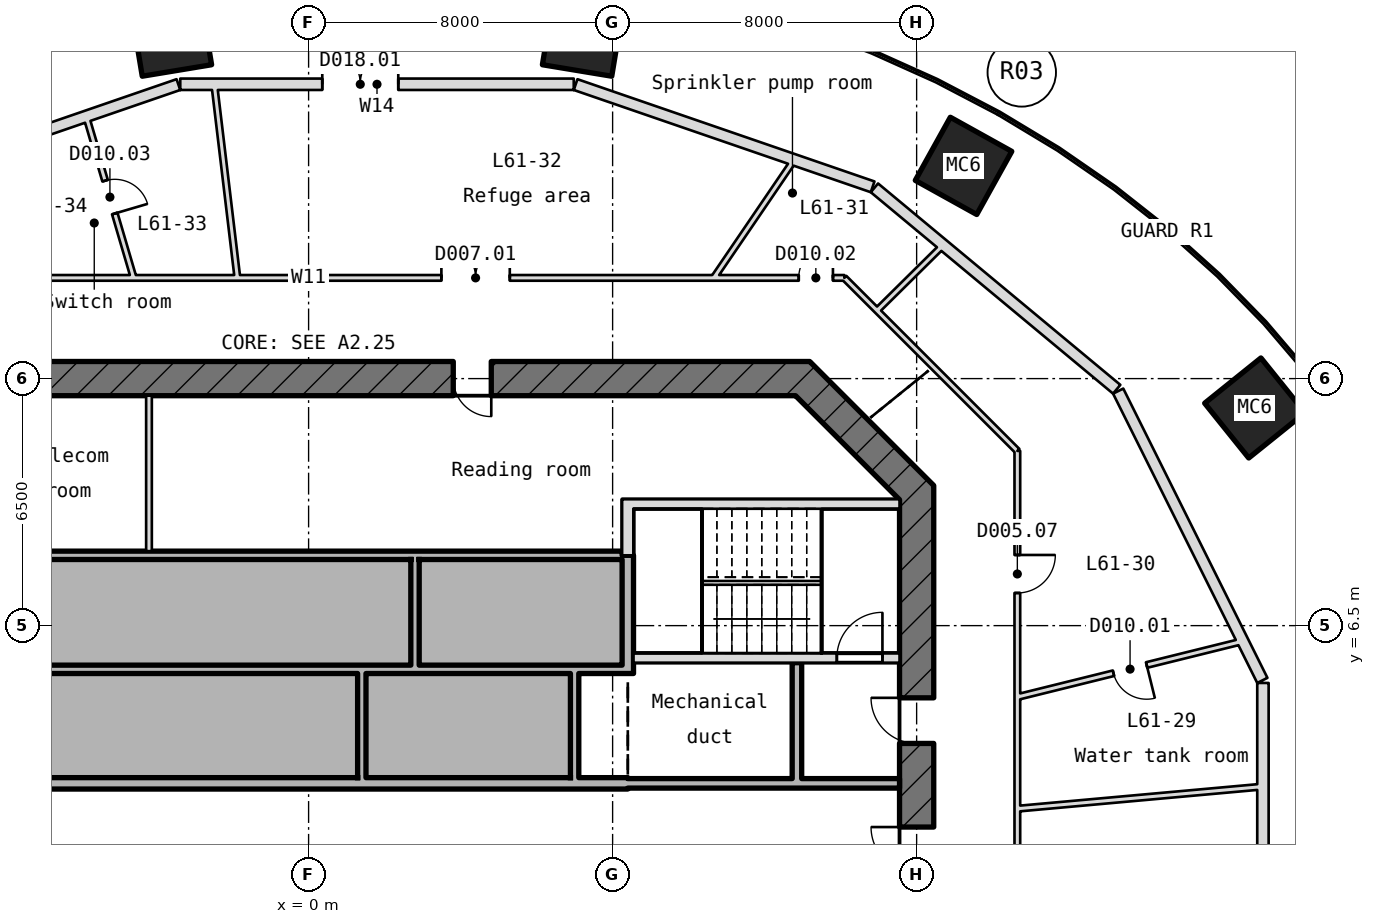
"""IFC4 building model, lengths in metres.
Left out: names, types, materials, properties, quantities, classifications, styles, units other than length and angle.
Written with IfcOpenShell. Run it as: python <this file> out.ifc"""

import sys

from ifc_helpers import new_model, si_unit, direction, frame, frame_2d, origin, place, context, subcontext, project, spatial, polyline, rectangle, outline, extrude, element, fill, save


model = new_model("IFC4")
c1 = context("Model", 3, precision=1e-05, world=origin(), true_north=direction((0.0, 1.0)))
c2 = subcontext(c1, "Body", "Model", "MODEL_VIEW")
j1 = project(units=[si_unit("LENGTHUNIT", "METRE"), si_unit("PLANEANGLEUNIT", "RADIAN")], contexts=[c1])
p1 = place(None, origin())
s1 = spatial("IfcSite", under=j1, at=p1, CompositionType="ELEMENT")
p2 = place(p1, origin())
s2 = spatial("IfcBuilding", under=s1, at=p2, CompositionType="ELEMENT")
p3 = place(p2, frame((0.0, 0.0, 273.1)))
s3 = spatial("IfcBuildingStorey", under=s2, at=p3, CompositionType="ELEMENT", Elevation=273.1)
p4 = place(p3, frame((0.0, 0.0, -0.3)))
e1 = element("IfcColumn", 1, at=p4, inside=s3, PredefinedType="COLUMN", context=c2, shape_type="SweptSolid", body=[
    extrude(outline(polyline([(28.339, 2.783), (25.704, 4.212), (25.273, 6.011), (27.121, 6.454), (29.756, 5.025), (30.186, 3.226), (28.339, 2.783)])), origin(), (0.0, 0.0, 1.0), 6.05),
])
p5 = place(p3, frame((0.0, 0.0, -0.3)))
e2 = element("IfcColumn", 2, at=p5, inside=s3, PredefinedType="COLUMN", context=c2, shape_type="SweptSolid", body=[
    extrude(outline(polyline([(24.738, 10.911), (22.17, 12.208), (21.011, 13.65), (22.491, 14.84), (25.06, 13.543), (26.219, 12.101), (24.738, 10.911)])), origin(), (0.0, 0.0, 1.0), 6.05),
])
p6 = place(p3, frame((0.0, 0.0, -0.3)))
e3 = element("IfcColumn", 3, at=p6, inside=s3, PredefinedType="COLUMN", context=c2, shape_type="SweptSolid", body=[
    extrude(outline(polyline([(17.582, 17.317), (15.136, 18.514), (13.518, 19.412), (14.441, 21.073), (16.887, 19.877), (18.504, 18.979), (17.582, 17.317)])), origin(), (0.0, 0.0, 1.0), 6.05),
])
p7 = place(p3, frame((0.0, 0.0, -0.3)))
e4 = element("IfcColumn", 4, at=p7, inside=s3, PredefinedType="COLUMN", context=c2, shape_type="SweptSolid", body=[
    extrude(outline(polyline([(7.978, 20.956), (6.152, 21.258), (3.866, 22.4), (4.176, 24.274), (6.001, 23.973), (8.287, 22.831), (7.978, 20.956)])), origin(), (0.0, 0.0, 1.0), 6.05),
])
p8 = place(p3, frame((0.0, 0.0, -0.3)))
e5 = element("IfcColumn", 5, at=p8, inside=s3, PredefinedType="COLUMN", context=c2, shape_type="SweptSolid", body=[
    extrude(outline(polyline([(-4.377, 20.956), (-6.491, 22.098), (-6.801, 23.973), (-4.976, 24.274), (-2.862, 23.133), (-2.552, 21.258), (-4.377, 20.956)])), origin(), (0.0, 0.0, 1.0), 6.05),
])
p9 = place(p3, frame((16.0, -10.186, -0.3), z_axis=(0.0, 0.0, 1.0), x_axis=(0.0, 1.0, 0.0)))
e6 = element("IfcWall", 6, at=p9, inside=s3, PredefinedType="SHEAR", context=c2, shape_type="SweptSolid", body=[
    extrude(rectangle(XDim=20.373, YDim=0.9, at=frame_2d((10.186, 0.0))), origin(), (0.0, 0.0, 1.0), 6.05),
])
p10 = place(p9, frame((8.986, 0.0, 0.3)))
e7 = element("IfcOpeningElement", 7, at=p10, cuts=e6, PredefinedType="OPENING", context=c2, shape_type="SweptSolid", body=[
    extrude(rectangle(XDim=2.4, YDim=2.1, at=frame_2d((1.2, 1.05))), frame((0.0, 0.46, 0.0), z_axis=(0.0, -1.0, 0.0), x_axis=(1.0, 0.0, 0.0)), (0.0, 0.0, 1.0), 0.92),
])
p11 = place(p9, frame((13.586, 0.0, 0.3)))
e8 = element("IfcOpeningElement", 8, at=p11, cuts=e6, PredefinedType="OPENING", context=c2, shape_type="SweptSolid", body=[
    extrude(rectangle(XDim=1.2, YDim=2.1, at=frame_2d((0.6, 1.05))), frame((0.0, 0.46, 0.0), z_axis=(0.0, -1.0, 0.0), x_axis=(1.0, 0.0, 0.0)), (0.0, 0.0, 1.0), 0.92),
])
p12 = place(p9, frame((2.4, 0.0, 0.3)))
e9 = element("IfcOpeningElement", 9, at=p12, cuts=e6, PredefinedType="OPENING", context=c2, shape_type="SweptSolid", body=[
    extrude(rectangle(XDim=1.2, YDim=2.1, at=frame_2d((0.6, 1.05))), frame((0.0, 0.46, 0.0), z_axis=(0.0, -1.0, 0.0), x_axis=(1.0, 0.0, 0.0)), (0.0, 0.0, 1.0), 0.92),
])
p13 = place(p3, frame((16.132, 9.868, -0.3), z_axis=(0.0, 0.0, 1.0), x_axis=(-0.707106781187, 0.707106781187, 0.0)))
e10 = element("IfcWall", 10, at=p13, inside=s3, PredefinedType="SHEAR", context=c2, shape_type="SweptSolid", body=[
    extrude(rectangle(XDim=4.615, YDim=0.9, at=frame_2d((2.308, 0.0))), origin(), (0.0, 0.0, 1.0), 6.05),
])
p14 = place(p3, frame((13.186, 13.0, -0.3), z_axis=(0.0, 0.0, 1.0), x_axis=(-1.0, 0.0, 0.0)))
e11 = element("IfcWall", 11, at=p14, inside=s3, PredefinedType="SHEAR", context=c2, shape_type="SweptSolid", body=[
    extrude(rectangle(XDim=26.373, YDim=0.9, at=frame_2d((13.186, 0.0))), origin(), (0.0, 0.0, 1.0), 6.05),
])
p15 = place(p14, frame((21.193, 0.0, 0.3)))
e12 = element("IfcOpeningElement", 12, at=p15, cuts=e11, PredefinedType="OPENING", context=c2, shape_type="SweptSolid", body=[
    extrude(rectangle(XDim=1.0, YDim=2.1, at=frame_2d((0.5, 1.05))), frame((0.0, 0.46, 0.0), z_axis=(0.0, -1.0, 0.0), x_axis=(1.0, 0.0, 0.0)), (0.0, 0.0, 1.0), 0.92),
])
p16 = place(p14, frame((8.379, 0.0, 0.3)))
e13 = element("IfcOpeningElement", 13, at=p16, cuts=e11, PredefinedType="OPENING", context=c2, shape_type="SweptSolid", body=[
    extrude(rectangle(XDim=1.0, YDim=2.1, at=frame_2d((0.5, 1.05))), frame((0.0, 0.46, 0.0), z_axis=(0.0, -1.0, 0.0), x_axis=(1.0, 0.0, 0.0)), (0.0, 0.0, 1.0), 0.92),
])
p17 = place(p3, frame((-8.4, 2.35, -0.3), z_axis=(0.0, 0.0, 1.0), x_axis=(1.0, 0.0, 0.0)))
e14 = element("IfcWall", 14, at=p17, inside=s3, PredefinedType="SHEAR", context=c2, shape_type="SweptSolid", body=[
    extrude(rectangle(XDim=16.8, YDim=0.3, at=frame_2d((8.4, 0.0))), origin(), (0.0, 0.0, 1.0), 6.05),
])
p18 = place(p3, frame((8.4, 2.35, 0.0), z_axis=(0.0, 0.0, 1.0), x_axis=(1.0, 0.0, 0.0)))
e15 = element("IfcWall", 15, at=p18, inside=s3, PredefinedType="STANDARD", context=c2, shape_type="SweptSolid", body=[
    extrude(rectangle(XDim=7.15, YDim=0.25, at=frame_2d((3.575, 0.0))), origin(), (0.0, 0.0, 1.0), 5.75),
])
p19 = place(p3, frame((-8.25, 5.35, 0.0), z_axis=(0.0, 0.0, 1.0), x_axis=(1.0, 0.0, 0.0)))
e16 = element("IfcWall", 16, at=p19, inside=s3, PredefinedType="STANDARD", context=c2, shape_type="SweptSolid", body=[
    extrude(rectangle(XDim=16.5, YDim=0.22, at=frame_2d((8.25, 0.0))), origin(), (0.0, 0.0, 1.0), 5.75),
])
p20 = place(p3, frame((8.55, 5.65, -0.3), z_axis=(0.0, 0.0, 1.0), x_axis=(1.0, 0.0, 0.0)))
e17 = element("IfcWall", 17, at=p20, inside=s3, PredefinedType="SHEAR", context=c2, shape_type="SweptSolid", body=[
    extrude(rectangle(XDim=7.0, YDim=0.25, at=frame_2d((3.5, 0.0))), origin(), (0.0, 0.0, 1.0), 6.05),
])
p21 = place(p20, frame((5.35, 0.0, 0.3)))
e18 = element("IfcOpeningElement", 18, at=p21, cuts=e17, PredefinedType="OPENING", context=c2, shape_type="SweptSolid", body=[
    extrude(rectangle(XDim=1.2, YDim=2.1, at=frame_2d((0.6, 1.05))), frame((0.0, 0.135, 0.0), z_axis=(0.0, -1.0, 0.0), x_axis=(1.0, 0.0, 0.0)), (0.0, 0.0, 1.0), 0.27),
])
p22 = place(p3, frame((-8.25, 8.35, 0.0), z_axis=(0.0, 0.0, 1.0), x_axis=(1.0, 0.0, 0.0)))
e19 = element("IfcWall", 19, at=p22, inside=s3, PredefinedType="STANDARD", context=c2, shape_type="SweptSolid", body=[
    extrude(rectangle(XDim=16.5, YDim=0.22, at=frame_2d((8.25, 0.0))), origin(), (0.0, 0.0, 1.0), 5.75),
])
p23 = place(p3, frame((8.55, 9.7, -0.3), z_axis=(0.0, 0.0, 1.0), x_axis=(1.0, 0.0, 0.0)))
e20 = element("IfcWall", 20, at=p23, inside=s3, PredefinedType="SHEAR", context=c2, shape_type="SweptSolid", body=[
    extrude(rectangle(XDim=7.0, YDim=0.25, at=frame_2d((3.5, 0.0))), origin(), (0.0, 0.0, 1.0), 6.05),
])
p24 = place(p3, frame((-4.2, 8.46, 0.0), z_axis=(0.0, 0.0, 1.0), x_axis=(0.0, 1.0, 0.0)))
e21 = element("IfcWall", 21, at=p24, inside=s3, PredefinedType="PARTITIONING", context=c2, shape_type="SweptSolid", body=[
    extrude(rectangle(XDim=4.09, YDim=0.15, at=frame_2d((2.045, 0.0))), origin(), (0.0, 0.0, 1.0), 5.75),
])
p25 = place(p3, frame((1.4, 2.5, 0.0), z_axis=(0.0, 0.0, 1.0), x_axis=(0.0, 1.0, 0.0)))
e22 = element("IfcWall", 22, at=p25, inside=s3, PredefinedType="STANDARD", context=c2, shape_type="SweptSolid", body=[
    extrude(rectangle(XDim=2.74, YDim=0.22, at=frame_2d((1.37, 0.0))), origin(), (0.0, 0.0, 1.0), 5.75),
])
p26 = place(p3, frame((2.8, 5.46, 0.0), z_axis=(0.0, 0.0, 1.0), x_axis=(0.0, 1.0, 0.0)))
e23 = element("IfcWall", 23, at=p26, inside=s3, PredefinedType="STANDARD", context=c2, shape_type="SweptSolid", body=[
    extrude(rectangle(XDim=2.78, YDim=0.22, at=frame_2d((1.39, 0.0))), origin(), (0.0, 0.0, 1.0), 5.75),
])
p27 = place(p3, frame((7.0, 2.5, 0.0), z_axis=(0.0, 0.0, 1.0), x_axis=(0.0, 1.0, 0.0)))
e24 = element("IfcWall", 24, at=p27, inside=s3, PredefinedType="STANDARD", context=c2, shape_type="SweptSolid", body=[
    extrude(rectangle(XDim=2.74, YDim=0.22, at=frame_2d((1.37, 0.0))), origin(), (0.0, 0.0, 1.0), 5.75),
])
p28 = place(p3, frame((8.4, 5.24, -0.3), z_axis=(0.0, 0.0, 1.0), x_axis=(0.0, 1.0, 0.0)))
e25 = element("IfcWall", 25, at=p28, inside=s3, PredefinedType="SHEAR", context=c2, shape_type="SweptSolid", body=[
    extrude(rectangle(XDim=3.11, YDim=0.3, at=frame_2d((1.555, 0.0))), origin(), (0.0, 0.0, 1.0), 6.05),
])
p29 = place(p3, frame((8.4, 8.35, -0.3), z_axis=(0.0, 0.0, 1.0), x_axis=(0.0, 1.0, 0.0)))
e26 = element("IfcWall", 26, at=p29, inside=s3, PredefinedType="SHEAR", context=c2, shape_type="SweptSolid", body=[
    extrude(rectangle(XDim=1.475, YDim=0.3, at=frame_2d((0.737, 0.0))), origin(), (0.0, 0.0, 1.0), 6.05),
])
p30 = place(p3, frame((12.85, 2.475, 0.0), z_axis=(0.0, 0.0, 1.0), x_axis=(0.0, 1.0, 0.0)))
e27 = element("IfcWall", 27, at=p30, inside=s3, PredefinedType="STANDARD", context=c2, shape_type="SweptSolid", body=[
    extrude(rectangle(XDim=3.05, YDim=0.25, at=frame_2d((1.525, 0.0))), origin(), (0.0, 0.0, 1.0), 5.75),
])
p31 = place(p3, frame((-3.377, 20.744, 0.0), z_axis=(0.0, 0.0, 1.0), x_axis=(1.0, 0.0, 0.0)))
e28 = element("IfcWall", 28, at=p31, inside=s3, PredefinedType="STANDARD", context=c2, shape_type="SweptSolid", body=[
    extrude(rectangle(XDim=10.354, YDim=0.3, at=frame_2d((5.177, 0.0))), origin(), (0.0, 0.0, 1.0), 5.75),
])
p32 = place(p31, frame((3.737, 0.0, 0.0)))
e29 = element("IfcOpeningElement", 29, at=p32, cuts=e28, PredefinedType="OPENING", context=c2, shape_type="SweptSolid", body=[
    extrude(rectangle(XDim=2.0, YDim=2.1, at=frame_2d((1.0, 1.05))), frame((0.0, 0.16, 0.0), z_axis=(0.0, -1.0, 0.0), x_axis=(1.0, 0.0, 0.0)), (0.0, 0.0, 1.0), 0.32),
])
p33 = place(p3, frame((-12.96, 17.454, 0.0), z_axis=(0.0, 0.0, 1.0), x_axis=(0.945548580173, 0.325481001799, 0.0)))
e30 = element("IfcWall", 30, at=p33, inside=s3, PredefinedType="STANDARD", context=c2, shape_type="SweptSolid", body=[
    extrude(rectangle(XDim=10.083, YDim=0.3, at=frame_2d((5.042, 0.0))), origin(), (0.0, 0.0, 1.0), 5.75),
])
p34 = place(p3, frame((25.113, -3.192, 0.0), z_axis=(0.0, 0.0, 1.0), x_axis=(0.0, 1.0, 0.0)))
e31 = element("IfcWall", 31, at=p34, inside=s3, PredefinedType="STANDARD", context=c2, shape_type="SweptSolid", body=[
    extrude(rectangle(XDim=8.183, YDim=0.3, at=frame_2d((4.092, 0.0))), origin(), (0.0, 0.0, 1.0), 5.75),
])
p35 = place(p3, frame((25.097, 5.059, 0.0), z_axis=(0.0, 0.0, 1.0), x_axis=(-0.446030602058, 0.895017710455, 0.0)))
e32 = element("IfcWall", 32, at=p35, inside=s3, PredefinedType="STANDARD", context=c2, shape_type="SweptSolid", body=[
    extrude(rectangle(XDim=8.505, YDim=0.3, at=frame_2d((4.253, 0.0))), origin(), (0.0, 0.0, 1.0), 5.75),
])
p36 = place(p3, frame((21.265, 12.719, 0.0), z_axis=(0.0, 0.0, 1.0), x_axis=(-0.769009973498, 0.639236779809, 0.0)))
e33 = element("IfcWall", 33, at=p36, inside=s3, PredefinedType="STANDARD", context=c2, shape_type="SweptSolid", body=[
    extrude(rectangle(XDim=8.291, YDim=0.3, at=frame_2d((4.146, 0.0))), origin(), (0.0, 0.0, 1.0), 5.75),
])
p37 = place(p3, frame((14.842, 18.046, 0.0), z_axis=(0.0, 0.0, 1.0), x_axis=(-0.945551742017, 0.325471816243, 0.0)))
e34 = element("IfcWall", 34, at=p37, inside=s3, PredefinedType="STANDARD", context=c2, shape_type="SweptSolid", body=[
    extrude(rectangle(XDim=8.266, YDim=0.3, at=frame_2d((4.133, 0.0))), origin(), (0.0, 0.0, 1.0), 5.75),
])
p38 = place(p3, frame((-14.098, 15.65, 0.0), z_axis=(0.0, 0.0, 1.0), x_axis=(1.0, 0.0, 0.0)))
e35 = element("IfcWall", 35, at=p38, inside=s3, PredefinedType="PARTITIONING", context=c2, shape_type="SweptSolid", body=[
    extrude(rectangle(XDim=28.195, YDim=0.15, at=frame_2d((14.098, 0.0))), origin(), (0.0, 0.0, 1.0), 5.75),
])
p39 = place(p38, frame((26.995, 0.0, 0.0)))
e36 = element("IfcOpeningElement", 36, at=p39, cuts=e35, PredefinedType="OPENING", context=c2, shape_type="SweptSolid", body=[
    extrude(rectangle(XDim=0.9, YDim=2.1, at=frame_2d((0.45, 1.05))), frame((0.0, 0.085, 0.0), z_axis=(0.0, -1.0, 0.0), x_axis=(1.0, 0.0, 0.0)), (0.0, 0.0, 1.0), 0.17),
])
p40 = place(p38, frame((17.592, 0.0, 0.0)))
e37 = element("IfcOpeningElement", 37, at=p40, cuts=e35, PredefinedType="OPENING", context=c2, shape_type="SweptSolid", body=[
    extrude(rectangle(XDim=1.8, YDim=2.1, at=frame_2d((0.9, 1.05))), frame((0.0, 0.085, 0.0), z_axis=(0.0, -1.0, 0.0), x_axis=(1.0, 0.0, 0.0)), (0.0, 0.0, 1.0), 0.17),
])
p41 = place(p38, frame((4.248, 0.0, 0.0)))
e38 = element("IfcOpeningElement", 38, at=p41, cuts=e35, PredefinedType="OPENING", context=c2, shape_type="SweptSolid", body=[
    extrude(rectangle(XDim=1.0, YDim=2.1, at=frame_2d((0.5, 1.05))), frame((0.0, 0.085, 0.0), z_axis=(0.0, -1.0, 0.0), x_axis=(1.0, 0.0, 0.0)), (0.0, 0.0, 1.0), 0.17),
])
p42 = place(p3, frame((18.65, 1.683, 0.0), z_axis=(0.0, 0.0, 1.0), x_axis=(0.995955876616, 0.089843707818, 0.0)))
e39 = element("IfcWall", 39, at=p42, inside=s3, PredefinedType="PARTITIONING", context=c2, shape_type="SweptSolid", body=[
    extrude(rectangle(XDim=6.489, YDim=0.15, at=frame_2d((3.245, 0.0))), origin(), (0.0, 0.0, 1.0), 5.75),
])
p43 = place(p3, frame((18.65, 4.621, 0.0), z_axis=(0.0, 0.0, 1.0), x_axis=(0.970650214712, 0.24049565626, 0.0)))
e40 = element("IfcWall", 40, at=p43, inside=s3, PredefinedType="PARTITIONING", context=c2, shape_type="SweptSolid", body=[
    extrude(rectangle(XDim=6.112, YDim=0.15, at=frame_2d((3.056, 0.0))), origin(), (0.0, 0.0, 1.0), 5.75),
])
p44 = place(p43, frame((2.606, 0.0, 0.0)))
e41 = element("IfcOpeningElement", 41, at=p44, cuts=e40, PredefinedType="OPENING", context=c2, shape_type="SweptSolid", body=[
    extrude(rectangle(XDim=0.9, YDim=2.1, at=frame_2d((0.45, 1.05))), frame((0.0, 0.085, 0.0), z_axis=(0.0, -1.0, 0.0), x_axis=(1.0, 0.0, 0.0)), (0.0, 0.0, 1.0), 0.17),
])
p45 = place(p3, frame((14.958, 14.79, 0.0), z_axis=(0.0, 0.0, 1.0), x_axis=(0.711079754695, 0.703111358508, 0.0)))
e42 = element("IfcWall", 42, at=p45, inside=s3, PredefinedType="PARTITIONING", context=c2, shape_type="SweptSolid", body=[
    extrude(rectangle(XDim=2.451, YDim=0.15, at=frame_2d((1.226, 0.0))), origin(), (0.0, 0.0, 1.0), 5.75),
])
p46 = place(p3, frame((10.661, 15.65, 0.0), z_axis=(0.0, 0.0, 1.0), x_axis=(0.563006246731, 0.826452639987, 0.0)))
e43 = element("IfcWall", 43, at=p46, inside=s3, PredefinedType="PARTITIONING", context=c2, shape_type="SweptSolid", body=[
    extrude(rectangle(XDim=3.759, YDim=0.15, at=frame_2d((1.879, 0.0))), origin(), (0.0, 0.0, 1.0), 5.75),
])
p47 = place(p3, frame((18.65, -8.776, 0.0), z_axis=(0.0, 0.0, 1.0), x_axis=(0.0, 1.0, 0.0)))
e44 = element("IfcWall", 44, at=p47, inside=s3, PredefinedType="PARTITIONING", context=c2, shape_type="SweptSolid", body=[
    extrude(rectangle(XDim=19.874, YDim=0.15, at=frame_2d((9.937, 0.0))), origin(), (0.0, 0.0, 1.0), 5.75),
])
p48 = place(p47, frame((16.135, 0.0, 0.0)))
e45 = element("IfcOpeningElement", 45, at=p48, cuts=e44, PredefinedType="OPENING", context=c2, shape_type="SweptSolid", body=[
    extrude(rectangle(XDim=1.0, YDim=2.1, at=frame_2d((0.5, 1.05))), frame((0.0, 0.085, 0.0), z_axis=(0.0, -1.0, 0.0), x_axis=(1.0, 0.0, 0.0)), (0.0, 0.0, 1.0), 0.17),
])
p49 = place(p47, frame((4.329, 0.0, 0.0)))
e46 = element("IfcOpeningElement", 46, at=p49, cuts=e44, PredefinedType="OPENING", context=c2, shape_type="SweptSolid", body=[
    extrude(rectangle(XDim=1.8, YDim=2.1, at=frame_2d((0.9, 1.05))), frame((0.0, 0.085, 0.0), z_axis=(0.0, -1.0, 0.0), x_axis=(1.0, 0.0, 0.0)), (0.0, 0.0, 1.0), 0.17),
])
p50 = place(p3, frame((-1.873, 15.65, 0.0), z_axis=(0.0, 0.0, 1.0), x_axis=(-0.118861895323, 0.992910796517, 0.0)))
e47 = element("IfcWall", 47, at=p50, inside=s3, PredefinedType="PARTITIONING", context=c2, shape_type="SweptSolid", body=[
    extrude(rectangle(XDim=5.131, YDim=0.15, at=frame_2d((2.565, 0.0))), origin(), (0.0, 0.0, 1.0), 5.75),
])
p51 = place(p3, frame((-4.603, 15.65, 0.0), z_axis=(0.0, 0.0, 1.0), x_axis=(-0.282157374925, 0.959368133604, 0.0)))
e48 = element("IfcWall", 48, at=p51, inside=s3, PredefinedType="PARTITIONING", context=c2, shape_type="SweptSolid", body=[
    extrude(rectangle(XDim=4.431, YDim=0.15, at=frame_2d((2.215, 0.0))), origin(), (0.0, 0.0, 1.0), 5.75),
])
p52 = place(p51, frame((1.765, 0.0, 0.0)))
e49 = element("IfcOpeningElement", 49, at=p52, cuts=e48, PredefinedType="OPENING", context=c2, shape_type="SweptSolid", body=[
    extrude(rectangle(XDim=0.9, YDim=2.1, at=frame_2d((0.45, 1.05))), frame((0.0, 0.085, 0.0), z_axis=(0.0, -1.0, 0.0), x_axis=(1.0, 0.0, 0.0)), (0.0, 0.0, 1.0), 0.17),
])
p53 = place(p3, frame((18.65, 11.098, 0.0), z_axis=(0.0, 0.0, 1.0), x_axis=(-0.707106781187, 0.707106781187, 0.0)))
e50 = element("IfcWall", 50, at=p53, inside=s3, PredefinedType="PARTITIONING", context=c2, shape_type="SweptSolid", body=[
    extrude(rectangle(XDim=6.438, YDim=0.15, at=frame_2d((3.219, 0.0))), origin(), (0.0, 0.0, 1.0), 5.75),
])
p54 = place(p21, origin())
e51 = element("IfcDoor", 51, at=p54, inside=s3, OperationType="SINGLE_SWING_RIGHT", PredefinedType="DOOR", context=c2, shape_type="SweptSolid", body=[
    extrude(rectangle(XDim=1.2, YDim=2.1, at=frame_2d((0.6, 1.05))), frame((0.0, 0.025, 0.0), z_axis=(0.0, -1.0, 0.0), x_axis=(1.0, 0.0, 0.0)), (0.0, 0.0, 1.0), 0.05),
])
fill(e18, e51)
p55 = place(p10, origin())
e52 = element("IfcDoor", 52, at=p55, inside=s3, OperationType="DOUBLE_DOOR_SINGLE_SWING", PredefinedType="DOOR", context=c2, shape_type="SweptSolid", body=[
    extrude(rectangle(XDim=2.4, YDim=2.1, at=frame_2d((1.2, 1.05))), frame((0.0, 0.025, 0.0), z_axis=(0.0, -1.0, 0.0), x_axis=(1.0, 0.0, 0.0)), (0.0, 0.0, 1.0), 0.05),
])
fill(e7, e52)
p56 = place(p11, origin())
e53 = element("IfcDoor", 53, at=p56, inside=s3, OperationType="SINGLE_SWING_RIGHT", PredefinedType="DOOR", context=c2, shape_type="SweptSolid", body=[
    extrude(rectangle(XDim=1.2, YDim=2.1, at=frame_2d((0.6, 1.05))), frame((0.0, 0.025, 0.0), z_axis=(0.0, -1.0, 0.0), x_axis=(1.0, 0.0, 0.0)), (0.0, 0.0, 1.0), 0.05),
])
fill(e8, e53)
p57 = place(p16, origin())
e54 = element("IfcDoor", 54, at=p57, inside=s3, OperationType="SINGLE_SWING_RIGHT", PredefinedType="DOOR", context=c2, shape_type="SweptSolid", body=[
    extrude(rectangle(XDim=1.0, YDim=2.1, at=frame_2d((0.5, 1.05))), frame((0.0, 0.025, 0.0), z_axis=(0.0, -1.0, 0.0), x_axis=(1.0, 0.0, 0.0)), (0.0, 0.0, 1.0), 0.05),
])
fill(e13, e54)
p58 = place(p44, frame((0.9, 0.0, 0.0), z_axis=(0.0, 0.0, 1.0), x_axis=(-1.0, 0.0, 0.0)))
e55 = element("IfcDoor", 55, at=p58, inside=s3, OperationType="SINGLE_SWING_LEFT", PredefinedType="DOOR", context=c2, shape_type="SweptSolid", body=[
    extrude(rectangle(XDim=0.9, YDim=2.1, at=frame_2d((0.45, 1.05))), frame((0.0, 0.025, 0.0), z_axis=(0.0, -1.0, 0.0), x_axis=(1.0, 0.0, 0.0)), (0.0, 0.0, 1.0), 0.05),
])
fill(e41, e55)
p59 = place(p48, frame((1.0, 0.0, 0.0), z_axis=(0.0, 0.0, 1.0), x_axis=(-1.0, 0.0, 0.0)))
e56 = element("IfcDoor", 56, at=p59, inside=s3, OperationType="SINGLE_SWING_LEFT", PredefinedType="DOOR", context=c2, shape_type="SweptSolid", body=[
    extrude(rectangle(XDim=1.0, YDim=2.1, at=frame_2d((0.5, 1.05))), frame((0.0, 0.025, 0.0), z_axis=(0.0, -1.0, 0.0), x_axis=(1.0, 0.0, 0.0)), (0.0, 0.0, 1.0), 0.05),
])
fill(e45, e56)
p60 = place(p39, origin())
e57 = element("IfcDoor", 57, at=p60, inside=s3, OperationType="SINGLE_SWING_RIGHT", PredefinedType="DOOR", context=c2, shape_type="SweptSolid", body=[
    extrude(rectangle(XDim=0.9, YDim=2.1, at=frame_2d((0.45, 1.05))), frame((0.0, 0.025, 0.0), z_axis=(0.0, -1.0, 0.0), x_axis=(1.0, 0.0, 0.0)), (0.0, 0.0, 1.0), 0.05),
])
fill(e36, e57)
p61 = place(p40, origin())
e58 = element("IfcDoor", 58, at=p61, inside=s3, OperationType="DOUBLE_DOOR_SINGLE_SWING", PredefinedType="DOOR", context=c2, shape_type="SweptSolid", body=[
    extrude(rectangle(XDim=1.8, YDim=2.1, at=frame_2d((0.9, 1.05))), frame((0.0, 0.025, 0.0), z_axis=(0.0, -1.0, 0.0), x_axis=(1.0, 0.0, 0.0)), (0.0, 0.0, 1.0), 0.05),
])
fill(e37, e58)
p62 = place(p32, origin())
e59 = element("IfcDoor", 59, at=p62, inside=s3, OperationType="DOUBLE_DOOR_SINGLE_SWING", PredefinedType="DOOR", context=c2, shape_type="SweptSolid", body=[
    extrude(rectangle(XDim=2.0, YDim=2.1, at=frame_2d((1.0, 1.05))), frame((0.0, 0.025, 0.0), z_axis=(0.0, -1.0, 0.0), x_axis=(1.0, 0.0, 0.0)), (0.0, 0.0, 1.0), 0.05),
])
fill(e29, e59)
p63 = place(p52, frame((0.9, 0.0, 0.0), z_axis=(0.0, 0.0, 1.0), x_axis=(-1.0, 0.0, 0.0)))
e60 = element("IfcDoor", 60, at=p63, inside=s3, OperationType="SINGLE_SWING_LEFT", PredefinedType="DOOR", context=c2, shape_type="SweptSolid", body=[
    extrude(rectangle(XDim=0.9, YDim=2.1, at=frame_2d((0.45, 1.05))), frame((0.0, 0.025, 0.0), z_axis=(0.0, -1.0, 0.0), x_axis=(1.0, 0.0, 0.0)), (0.0, 0.0, 1.0), 0.05),
])
fill(e49, e60)
save(model, sys.argv[1])
